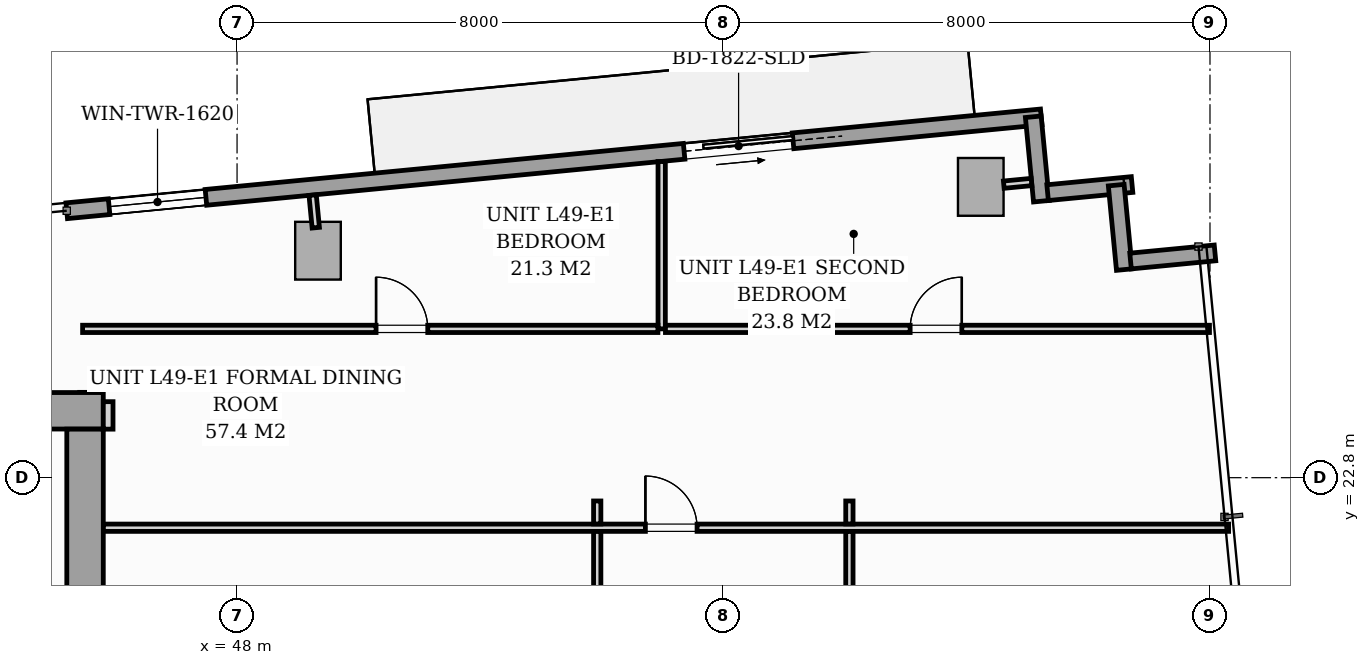
"""IFC4 building model, lengths in metres.
Left out: names, types, materials, properties, quantities, classifications, styles, units other than length and angle.
Written with IfcOpenShell. Run it as: python <this file> out.ifc"""

import sys

from ifc_helpers import new_model, si_unit, direction, frame, frame_2d, origin, origin_2d, place, context, subcontext, project, spatial, rectangle, i_section, extrude, source, transform, mapped, element, fill, save


model = new_model("IFC4")
c1 = context("Model", 3, precision=1e-05, world=origin(), true_north=direction((0.0, 1.0)))
c2 = subcontext(c1, "Body", "Model", "MODEL_VIEW")
j1 = project(units=[si_unit("LENGTHUNIT", "METRE"), si_unit("PLANEANGLEUNIT", "RADIAN")], contexts=[c1])
p1 = place(None, origin())
s1 = spatial("IfcSite", under=j1, at=p1, CompositionType="ELEMENT")
p2 = place(p1, origin())
s2 = spatial("IfcBuilding", under=s1, at=p2, CompositionType="ELEMENT")
p3 = place(p2, frame((0.0, 0.0, 173.0)))
s3 = spatial("IfcBuildingStorey", under=s2, at=p3, CompositionType="ELEMENT", Elevation=173.0)
m1 = source(origin(), c2, "Body", "SweptSolid", [
    extrude(i_section(OverallWidth=0.416, OverallDepth=0.446, WebThickness=0.039, FlangeThickness=0.063, FilletRadius=0.018, at=origin_2d()), origin(), (0.0, 0.0, 1.0), 3.196),
])
p4 = place(p3, frame((45.6, 24.0, 0.002), z_axis=(0.0, 0.0, 1.0), x_axis=(1.0, 0.0, 0.0)))
e1 = element("IfcColumn", 1, at=p4, inside=s3, PredefinedType="PILASTER", context=c2, shape_type="MappedRepresentation", body=[
    mapped(m1, transform((0.0, 0.0, 0.0), scale=1.0)),
])
m2 = source(origin(), c2, "Body", "SweptSolid", [
    extrude(rectangle(XDim=0.75, YDim=0.95, at=origin_2d()), origin(), (0.0, 0.0, 1.0), 3.196),
])
for number, where, z_axis, x_axis in (
    (2, (49.331, 26.533, 0.002), (0.0, 0.0, 1.0), (0.995, 0.096, 0.0)),
    (3, (60.23, 27.582, 0.002), (0.0, 0.0, 1.0), (0.995, 0.096, 0.0)),
):
    element("IfcColumn", number, at=place(p3, frame(where, z_axis=z_axis, x_axis=x_axis)), inside=s3, PredefinedType="COLUMN", context=c2, shape_type="MappedRepresentation", body=[
        mapped(m2, transform((0.0, 0.0, 0.0), scale=1.0)),
    ])
p5 = place(p3, frame((45.199, 27.19, 0.0), z_axis=(0.0, 0.0, 1.0), x_axis=(0.995397074604, 0.095836652014, 0.0)))
e4 = element("IfcWall", 4, at=p5, inside=s3, PredefinedType="STANDARD", context=c2, shape_type="SweptSolid", body=[
    extrude(rectangle(XDim=16.1, YDim=0.26, at=frame_2d((8.05, 0.0))), origin(), (0.0, 0.0, 1.0), 2.94),
])
p6 = place(p5, frame((10.2, 0.0, 0.0)))
e5 = element("IfcOpeningElement", 5, at=p6, cuts=e4, PredefinedType="OPENING", context=c2, shape_type="SweptSolid", body=[
    extrude(rectangle(XDim=1.8, YDim=2.06, at=frame_2d((0.9, 1.03))), frame((0.0, 0.14, 0.0), z_axis=(0.0, -1.0, 0.0), x_axis=(1.0, 0.0, 0.0)), (0.0, 0.0, 1.0), 0.28),
])
p7 = place(p5, frame((0.7, 0.0, 0.65)))
e6 = element("IfcOpeningElement", 6, at=p7, cuts=e4, PredefinedType="OPENING", context=c2, shape_type="SweptSolid", body=[
    extrude(rectangle(XDim=1.6, YDim=1.5, at=frame_2d((0.8, 0.75))), frame((0.0, 0.14, 0.0), z_axis=(0.0, -1.0, 0.0), x_axis=(1.0, 0.0, 0.0)), (0.0, 0.0, 1.0), 0.28),
])
p8 = place(p3, frame((61.094, 28.735, 0.0), z_axis=(0.0, 0.0, 1.0), x_axis=(0.095742423056, -0.99540614245, 0.0)))
e7 = element("IfcWall", 7, at=p8, inside=s3, PredefinedType="STANDARD", context=c2, shape_type="SweptSolid", body=[
    extrude(rectangle(XDim=1.395, YDim=0.26, at=frame_2d((0.697, 0.0))), origin(), (0.0, 0.0, 1.0), 2.94),
])
p9 = place(p3, frame((61.33, 27.487, 0.0), z_axis=(0.0, 0.0, 1.0), x_axis=(0.995391056452, 0.09589913835, 0.0)))
e8 = element("IfcWall", 8, at=p9, inside=s3, PredefinedType="STANDARD", context=c2, shape_type="SweptSolid", body=[
    extrude(rectangle(XDim=1.395, YDim=0.26, at=frame_2d((0.698, 0.0))), origin(), (0.0, 0.0, 1.0), 2.94),
])
for number, where, z_axis, x_axis in (
    (9, (62.458, 27.611, 0.0), (0.0, 0.0, 1.0), (0.096, -0.995, 0.0)),
    (10, (62.694, 26.363, 0.0), (0.0, 0.0, 1.0), (0.995, 0.096, 0.0)),
):
    element("IfcWall", number, at=place(p3, frame(where, z_axis=z_axis, x_axis=x_axis)), inside=s3, PredefinedType="STANDARD", context=c2, shape_type="SweptSolid", body=[
        extrude(rectangle(XDim=1.395, YDim=0.26, at=frame_2d((0.697, 0.0))), origin(), (0.0, 0.0, 1.0), 2.94),
    ])
p10 = place(p3, frame((26.2, 23.9, 0.0), z_axis=(0.0, 0.0, 1.0), x_axis=(1.0, 0.0, 0.0)))
e11 = element("IfcWall", 11, at=p10, inside=s3, PredefinedType="SHEAR", context=c2, shape_type="SweptSolid", body=[
    extrude(rectangle(XDim=19.6, YDim=0.6, at=frame_2d((9.8, 0.0))), origin(), (0.0, 0.0, 1.0), 3.2),
])
p11 = place(p3, frame((45.5, 17.802, 0.0), z_axis=(0.0, 0.0, 1.0), x_axis=(0.0, 1.0, 0.0)))
e12 = element("IfcWall", 12, at=p11, inside=s3, PredefinedType="SHEAR", context=c2, shape_type="SweptSolid", body=[
    extrude(rectangle(XDim=5.796, YDim=0.6, at=frame_2d((2.898, 0.0))), origin(), (0.0, 0.0, 1.0), 3.2),
])
p12 = place(p3, frame((45.88, 23.598, 0.0), z_axis=(0.0, 0.0, 1.0), x_axis=(0.0, 1.0, 0.0)))
e13 = element("IfcWall", 13, at=p12, inside=s3, PredefinedType="PARTITIONING", context=c2, shape_type="SweptSolid", body=[
    extrude(rectangle(XDim=0.452, YDim=0.16, at=frame_2d((0.226, 0.0))), origin(), (0.0, 0.0, 1.0), 2.94),
])
p13 = place(p3, frame((54.983, 25.247, 0.0), z_axis=(0.0, 0.0, 1.0), x_axis=(0.0, 1.0, 0.0)))
e14 = element("IfcWall", 14, at=p13, inside=s3, PredefinedType="PARTITIONING", context=c2, shape_type="SweptSolid", body=[
    extrude(rectangle(XDim=2.752, YDim=0.12, at=frame_2d((1.376, 0.0))), origin(), (0.0, 0.0, 1.0), 2.94),
])
p14 = place(p3, frame((45.46, 25.247, 0.0), z_axis=(0.0, 0.0, 1.0), x_axis=(1.0, 0.0, 0.0)))
e15 = element("IfcWall", 15, at=p14, inside=s3, PredefinedType="PARTITIONING", context=c2, shape_type="SweptSolid", body=[
    extrude(rectangle(XDim=9.461, YDim=0.12, at=frame_2d((4.73, 0.0))), origin(), (0.0, 0.0, 1.0), 2.94),
])
p15 = place(p14, frame((4.826, 0.0, 0.0)))
e16 = element("IfcOpeningElement", 16, at=p15, cuts=e15, PredefinedType="OPENING", context=c2, shape_type="SweptSolid", body=[
    extrude(rectangle(XDim=0.85, YDim=2.05, at=frame_2d((0.425, 1.025))), frame((0.0, 0.07, 0.0), z_axis=(0.0, -1.0, 0.0), x_axis=(1.0, 0.0, 0.0)), (0.0, 0.0, 1.0), 0.14),
])
p16 = place(p3, frame((55.045, 25.247, 0.0), z_axis=(0.0, 0.0, 1.0), x_axis=(1.0, 0.0, 0.0)))
e17 = element("IfcWall", 17, at=p16, inside=s3, PredefinedType="PARTITIONING", context=c2, shape_type="SweptSolid", body=[
    extrude(rectangle(XDim=8.947, YDim=0.12, at=frame_2d((4.473, 0.0))), origin(), (0.0, 0.0, 1.0), 2.94),
])
p17 = place(p16, frame((4.024, 0.0, 0.0)))
e18 = element("IfcOpeningElement", 18, at=p17, cuts=e17, PredefinedType="OPENING", context=c2, shape_type="SweptSolid", body=[
    extrude(rectangle(XDim=0.85, YDim=2.05, at=frame_2d((0.425, 1.025))), frame((0.0, 0.07, 0.0), z_axis=(0.0, -1.0, 0.0), x_axis=(1.0, 0.0, 0.0)), (0.0, 0.0, 1.0), 0.14),
])
p18 = place(p3, frame((45.802, 21.977, 0.0), z_axis=(0.0, 0.0, 1.0), x_axis=(1.0, 0.0, 0.0)))
e19 = element("IfcWall", 19, at=p18, inside=s3, PredefinedType="PARTITIONING", context=c2, shape_type="SweptSolid", body=[
    extrude(rectangle(XDim=18.504, YDim=0.12, at=frame_2d((9.252, 0.0))), origin(), (0.0, 0.0, 1.0), 2.94),
])
p19 = place(p18, frame((8.913, 0.0, 0.0)))
e20 = element("IfcOpeningElement", 20, at=p19, cuts=e19, PredefinedType="OPENING", context=c2, shape_type="SweptSolid", body=[
    extrude(rectangle(XDim=0.85, YDim=2.05, at=frame_2d((0.425, 1.025))), frame((0.0, 0.07, 0.0), z_axis=(0.0, -1.0, 0.0), x_axis=(1.0, 0.0, 0.0)), (0.0, 0.0, 1.0), 0.14),
])
p20 = place(p3, frame((58.07, 11.44, 0.0), z_axis=(0.0, 0.0, 1.0), x_axis=(0.0, 1.0, 0.0)))
e21 = element("IfcWall", 21, at=p20, inside=s3, PredefinedType="PARTITIONING", context=c2, shape_type="SweptSolid", body=[
    extrude(rectangle(XDim=10.475, YDim=0.12, at=frame_2d((5.238, 0.0))), origin(), (0.0, 0.0, 1.0), 2.94),
])
p21 = place(p20, frame((4.812, 0.0, 0.0)))
e22 = element("IfcOpeningElement", 22, at=p21, cuts=e21, PredefinedType="OPENING", context=c2, shape_type="SweptSolid", body=[
    extrude(rectangle(XDim=0.85, YDim=2.05, at=frame_2d((0.425, 1.025))), frame((0.0, 0.07, 0.0), z_axis=(0.0, -1.0, 0.0), x_axis=(1.0, 0.0, 0.0)), (0.0, 0.0, 1.0), 0.14),
])
p22 = place(p3, frame((58.07, 22.039, 0.0), z_axis=(0.0, 0.0, 1.0), x_axis=(0.0, 1.0, 0.0)))
e23 = element("IfcWall", 23, at=p22, inside=s3, PredefinedType="PARTITIONING", context=c2, shape_type="SweptSolid", body=[
    extrude(rectangle(XDim=0.378, YDim=0.12, at=frame_2d((0.189, 0.0))), origin(), (0.0, 0.0, 1.0), 2.94),
])
p23 = place(p3, frame((53.923, 11.44, 0.0), z_axis=(0.0, 0.0, 1.0), x_axis=(0.0, 1.0, 0.0)))
e24 = element("IfcWall", 24, at=p23, inside=s3, PredefinedType="PARTITIONING", context=c2, shape_type="SweptSolid", body=[
    extrude(rectangle(XDim=10.475, YDim=0.12, at=frame_2d((5.238, 0.0))), origin(), (0.0, 0.0, 1.0), 2.94),
])
p24 = place(p23, frame((4.812, 0.0, 0.0)))
e25 = element("IfcOpeningElement", 25, at=p24, cuts=e24, PredefinedType="OPENING", context=c2, shape_type="SweptSolid", body=[
    extrude(rectangle(XDim=0.85, YDim=2.05, at=frame_2d((0.425, 1.025))), frame((0.0, 0.07, 0.0), z_axis=(0.0, -1.0, 0.0), x_axis=(1.0, 0.0, 0.0)), (0.0, 0.0, 1.0), 0.14),
])
p25 = place(p3, frame((53.923, 22.039, 0.0), z_axis=(0.0, 0.0, 1.0), x_axis=(0.0, 1.0, 0.0)))
e26 = element("IfcWall", 26, at=p25, inside=s3, PredefinedType="PARTITIONING", context=c2, shape_type="SweptSolid", body=[
    extrude(rectangle(XDim=0.378, YDim=0.12, at=frame_2d((0.189, 0.0))), origin(), (0.0, 0.0, 1.0), 2.94),
])
p26 = place(p3, frame((49.294, 26.911, 0.0), z_axis=(0.0, 0.0, 1.0), x_axis=(-0.095772948675, 0.995403205893, 0.0)))
e27 = element("IfcWall", 27, at=p26, inside=s3, PredefinedType="PARTITIONING", context=c2, shape_type="SweptSolid", body=[
    extrude(rectangle(XDim=0.538, YDim=0.12, at=frame_2d((0.269, 0.0))), origin(), (0.0, 0.0, 1.0), 2.94),
])
p27 = place(p3, frame((60.609, 27.618, 0.0), z_axis=(0.0, 0.0, 1.0), x_axis=(0.995384576284, 0.09596637586, 0.0)))
e28 = element("IfcWall", 28, at=p27, inside=s3, PredefinedType="PARTITIONING", context=c2, shape_type="SweptSolid", body=[
    extrude(rectangle(XDim=0.458, YDim=0.12, at=frame_2d((0.229, 0.0))), origin(), (0.0, 0.0, 1.0), 2.94),
])
m3 = source(origin(), c2, "Body", "SweptSolid", [
    extrude(rectangle(XDim=1.8, YDim=2.06, at=frame_2d((0.9, 1.03))), frame((0.0, 0.025, 0.0), z_axis=(0.0, -1.0, 0.0), x_axis=(1.0, 0.0, 0.0)), (0.0, 0.0, 1.0), 0.05),
])
p28 = place(p6, origin())
e29 = element("IfcDoor", 29, at=p28, inside=s3, OperationType="SLIDING_TO_RIGHT", PredefinedType="DOOR", context=c2, shape_type="MappedRepresentation", body=[
    mapped(m3, transform((0.0, 0.0, 0.0), scale=1.0)),
])
fill(e5, e29)
m4 = source(origin(), c2, "Body", "SweptSolid", [
    extrude(rectangle(XDim=1.6, YDim=1.5, at=frame_2d((0.8, 0.75))), frame((0.0, 0.03, 0.0), z_axis=(0.0, -1.0, 0.0), x_axis=(1.0, 0.0, 0.0)), (0.0, 0.0, 1.0), 0.06),
])
p29 = place(p7, origin())
e30 = element("IfcWindow", 30, at=p29, inside=s3, PartitioningType="SINGLE_PANEL", PredefinedType="WINDOW", context=c2, shape_type="MappedRepresentation", body=[
    mapped(m4, transform((0.0, 0.0, 0.0), scale=1.0)),
])
fill(e6, e30)
m5 = source(origin(), c2, "Body", "SweptSolid", [
    extrude(rectangle(XDim=0.85, YDim=2.05, at=frame_2d((0.425, 1.025))), frame((0.0, 0.025, 0.0), z_axis=(0.0, -1.0, 0.0), x_axis=(1.0, 0.0, 0.0)), (0.0, 0.0, 1.0), 0.05),
])
p30 = place(p15, origin())
e31 = element("IfcDoor", 31, at=p30, inside=s3, OperationType="SINGLE_SWING_LEFT", PredefinedType="DOOR", context=c2, shape_type="MappedRepresentation", body=[
    mapped(m5, transform((0.0, 0.0, 0.0), scale=1.0)),
])
fill(e16, e31)
p31 = place(p17, origin())
e32 = element("IfcDoor", 32, at=p31, inside=s3, OperationType="SINGLE_SWING_RIGHT", PredefinedType="DOOR", context=c2, shape_type="MappedRepresentation", body=[
    mapped(m5, transform((0.0, 0.0, 0.0), scale=1.0)),
])
fill(e18, e32)
p32 = place(p19, origin())
e33 = element("IfcDoor", 33, at=p32, inside=s3, OperationType="SINGLE_SWING_LEFT", PredefinedType="DOOR", context=c2, shape_type="MappedRepresentation", body=[
    mapped(m5, transform((0.0, 0.0, 0.0), scale=1.0)),
])
fill(e20, e33)
save(model, sys.argv[1])
